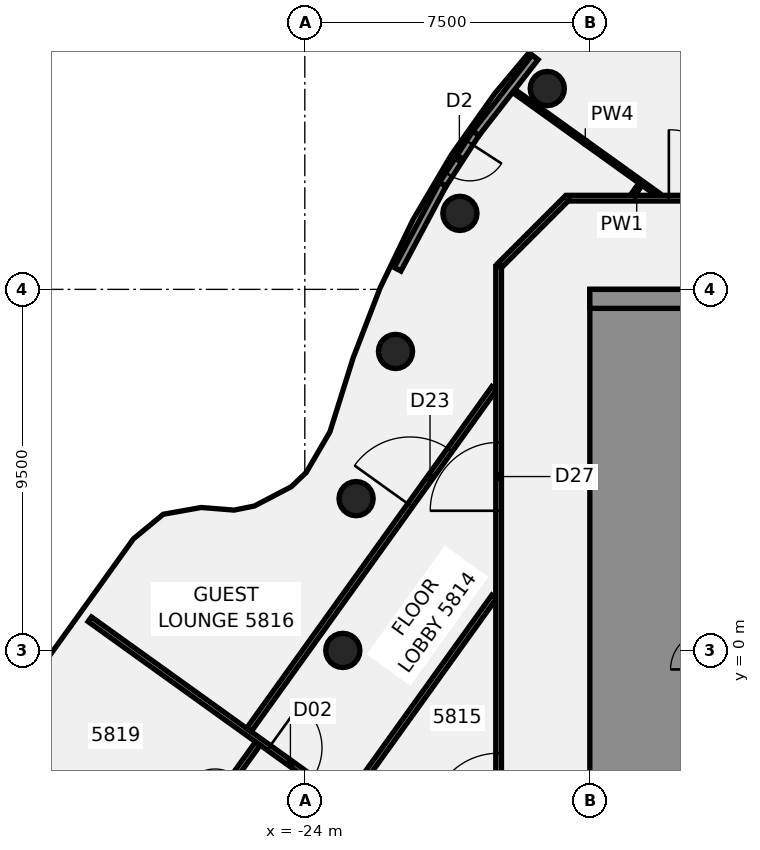
"""IFC4 building model, lengths in metres.
Left out: names, types, materials, properties, quantities, classifications, styles, units other than length and angle.
Written with IfcOpenShell. Run it as: python <this file> out.ifc"""

import sys

from ifc_helpers import new_model, si_unit, direction, frame, frame_2d, origin, origin_2d, place, context, subcontext, project, spatial, polyline, rectangle, circle, outline, extrude, element, fill, save


model = new_model("IFC4")
c1 = context("Model", 3, precision=1e-05, world=origin(), true_north=direction((0.0, 1.0)))
c2 = subcontext(c1, "Body", "Model", "MODEL_VIEW")
j1 = project(units=[si_unit("LENGTHUNIT", "METRE"), si_unit("PLANEANGLEUNIT", "RADIAN")], contexts=[c1])
p1 = place(None, origin())
s1 = spatial("IfcSite", under=j1, at=p1, CompositionType="ELEMENT")
p2 = place(p1, origin())
s2 = spatial("IfcBuilding", under=s1, at=p2, CompositionType="ELEMENT")
p3 = place(p2, frame((0.0, 0.0, 230.7)))
s3 = spatial("IfcBuildingStorey", under=s2, at=p3, CompositionType="ELEMENT", Elevation=230.7)
for number, where, z_axis, x_axis in (
    (1, (-17.619, 14.784, -0.14), (0.0, 0.0, 1.0), (1.0, 0.0, 0.0)),
    (2, (-19.919, 11.5, -0.14), (0.0, 0.0, 1.0), (1.0, 0.0, 0.0)),
    (3, (-21.613, 7.866, -0.14), (0.0, 0.0, 1.0), (1.0, 0.0, 0.0)),
    (4, (-22.651, 3.994, -0.14), (0.0, 0.0, 1.0), (1.0, 0.0, 0.0)),
    (5, (-23.0, 0.0, -0.14), (0.0, 0.0, 1.0), (1.0, 0.0, 0.0)),
):
    element("IfcColumn", number, at=place(p3, frame(where, z_axis=z_axis, x_axis=x_axis)), inside=s3, PredefinedType="COLUMN", context=c2, shape_type="SweptSolid", body=[
        extrude(circle(Radius=0.45, at=origin_2d()), origin(), (0.0, 0.0, 1.0), 3.6),
    ])
p4 = place(p3, frame((-29.658, 0.819, 0.0), z_axis=(0.0, 0.0, 1.0), x_axis=(0.812385674916, -0.583120498003, 0.0)))
e6 = element("IfcWall", 6, at=p4, inside=s3, PredefinedType="PARTITIONING", context=c2, shape_type="SweptSolid", body=[
    extrude(rectangle(XDim=8.091, YDim=0.15, at=frame_2d((4.045, 0.0))), origin(), (0.0, 0.0, 1.0), 2.864),
])
p5 = place(p4, frame((5.799, 0.0, 0.0)))
e7 = element("IfcOpeningElement", 7, at=p5, cuts=e6, PredefinedType="OPENING", context=c2, shape_type="SweptSolid", body=[
    extrude(rectangle(XDim=1.4, YDim=2.1, at=frame_2d((0.7, 1.05))), frame((0.0, 0.085, 0.0), z_axis=(0.0, -1.0, 0.0), x_axis=(1.0, 0.0, 0.0)), (0.0, 0.0, 1.0), 0.17),
])
p6 = place(p3, frame((-18.533, 14.744, 0.0), z_axis=(0.0, 0.0, 1.0), x_axis=(0.812404895157, -0.583093720019, 0.0)))
e8 = element("IfcWall", 8, at=p6, inside=s3, PredefinedType="PARTITIONING", context=c2, shape_type="SweptSolid", body=[
    extrude(rectangle(XDim=4.713, YDim=0.1, at=frame_2d((2.357, 0.0))), origin(), (0.0, 0.0, 1.0), 2.864),
])
p7 = place(p3, frame((-17.065, 11.9, 0.0), z_axis=(0.0, 0.0, 1.0), x_axis=(1.0, 0.0, 0.0)))
e9 = element("IfcWall", 9, at=p7, inside=s3, PredefinedType="PARTITIONING", context=c2, shape_type="SweptSolid", body=[
    extrude(rectangle(XDim=34.165, YDim=0.15, at=frame_2d((17.083, 0.0))), origin(), (0.0, 0.0, 1.0), 2.864),
])
p8 = place(p7, frame((24.726, 0.0, 0.0)))
e10 = element("IfcOpeningElement", 10, at=p8, cuts=e9, PredefinedType="OPENING", context=c2, shape_type="SweptSolid", body=[
    extrude(rectangle(XDim=1.8, YDim=2.1, at=frame_2d((0.9, 1.05))), frame((0.0, 0.085, 0.0), z_axis=(0.0, -1.0, 0.0), x_axis=(1.0, 0.0, 0.0)), (0.0, 0.0, 1.0), 0.17),
])
p9 = place(p7, frame((9.395, 0.0, 0.0)))
e11 = element("IfcOpeningElement", 11, at=p9, cuts=e9, PredefinedType="OPENING", context=c2, shape_type="SweptSolid", body=[
    extrude(rectangle(XDim=1.8, YDim=2.1, at=frame_2d((0.9, 1.05))), frame((0.0, 0.085, 0.0), z_axis=(0.0, -1.0, 0.0), x_axis=(1.0, 0.0, 0.0)), (0.0, 0.0, 1.0), 0.17),
])
p10 = place(p7, frame((2.645, 0.0, 0.0)))
e12 = element("IfcOpeningElement", 12, at=p10, cuts=e9, PredefinedType="OPENING", context=c2, shape_type="SweptSolid", body=[
    extrude(rectangle(XDim=1.8, YDim=2.1, at=frame_2d((0.9, 1.05))), frame((0.0, 0.085, 0.0), z_axis=(0.0, -1.0, 0.0), x_axis=(1.0, 0.0, 0.0)), (0.0, 0.0, 1.0), 0.17),
])
p11 = place(p3, frame((-18.872, 10.128, 0.0), z_axis=(0.0, 0.0, 1.0), x_axis=(0.707106781187, 0.707106781187, 0.0)))
e13 = element("IfcWall", 13, at=p11, inside=s3, PredefinedType="PARTITIONING", context=c2, shape_type="SweptSolid", body=[
    extrude(rectangle(XDim=2.505, YDim=0.15, at=frame_2d((1.253, 0.0))), origin(), (0.0, 0.0, 1.0), 2.864),
])
p12 = place(p3, frame((-27.5, -5.604, 0.0), z_axis=(0.0, 0.0, 1.0), x_axis=(0.583087553975, 0.812409320724, 0.0)))
e14 = element("IfcWall", 14, at=p12, inside=s3, PredefinedType="PARTITIONING", context=c2, shape_type="SweptSolid", body=[
    extrude(rectangle(XDim=3.881, YDim=0.15, at=frame_2d((1.94, 0.0))), origin(), (0.0, 0.0, 1.0), 2.864),
])
p13 = place(p12, frame((1.95, 0.0, 0.0)))
e15 = element("IfcOpeningElement", 15, at=p13, cuts=e14, PredefinedType="OPENING", context=c2, shape_type="SweptSolid", body=[
    extrude(rectangle(XDim=0.9, YDim=2.1, at=frame_2d((0.45, 1.05))), frame((0.0, 0.085, 0.0), z_axis=(0.0, -1.0, 0.0), x_axis=(1.0, 0.0, 0.0)), (0.0, 0.0, 1.0), 0.17),
])
p14 = place(p3, frame((-25.469, -2.089, 0.0), z_axis=(0.0, 0.0, 1.0), x_axis=(0.583125400674, 0.812382155816, 0.0)))
e16 = element("IfcWall", 16, at=p14, inside=s3, PredefinedType="PARTITIONING", context=c2, shape_type="SweptSolid", body=[
    extrude(rectangle(XDim=11.066, YDim=0.15, at=frame_2d((5.533, 0.0))), origin(), (0.0, 0.0, 1.0), 2.864),
])
p15 = place(p14, frame((7.27, 0.0, 0.0)))
e17 = element("IfcOpeningElement", 17, at=p15, cuts=e16, PredefinedType="OPENING", context=c2, shape_type="SweptSolid", body=[
    extrude(rectangle(XDim=1.8, YDim=2.1, at=frame_2d((0.9, 1.05))), frame((0.0, 0.085, 0.0), z_axis=(0.0, -1.0, 0.0), x_axis=(1.0, 0.0, 0.0)), (0.0, 0.0, 1.0), 0.17),
])
p16 = place(p3, frame((-15.367, 11.985, 0.0), z_axis=(0.0, 0.0, 1.0), x_axis=(0.583110991792, 0.812392498274, 0.0)))
e18 = element("IfcWall", 18, at=p16, inside=s3, PredefinedType="PARTITIONING", context=c2, shape_type="SweptSolid", body=[
    extrude(rectangle(XDim=0.345, YDim=0.1, at=frame_2d((0.172, 0.0))), origin(), (0.0, 0.0, 1.0), 2.864),
])
p17 = place(p3, frame((-22.581, -3.553, 0.0), z_axis=(0.0, 0.0, 1.0), x_axis=(0.58311080808, 0.812392630137, 0.0)))
e19 = element("IfcWall", 19, at=p17, inside=s3, PredefinedType="PARTITIONING", context=c2, shape_type="SweptSolid", body=[
    extrude(rectangle(XDim=6.112, YDim=0.15, at=frame_2d((3.056, 0.0))), origin(), (0.0, 0.0, 1.0), 2.864),
])
p18 = place(p3, frame((-18.9, -10.1, 0.0), z_axis=(0.0, 0.0, 1.0), x_axis=(0.0, 1.0, 0.0)))
e20 = element("IfcWall", 20, at=p18, inside=s3, PredefinedType="PARTITIONING", context=c2, shape_type="SweptSolid", body=[
    extrude(rectangle(XDim=20.2, YDim=0.15, at=frame_2d((10.1, 0.0))), origin(), (0.0, 0.0, 1.0), 2.864),
])
p19 = place(p18, frame((13.775, 0.0, 0.0)))
e21 = element("IfcOpeningElement", 21, at=p19, cuts=e20, PredefinedType="OPENING", context=c2, shape_type="SweptSolid", body=[
    extrude(rectangle(XDim=1.8, YDim=2.1, at=frame_2d((0.9, 1.05))), frame((0.0, 0.085, 0.0), z_axis=(0.0, -1.0, 0.0), x_axis=(1.0, 0.0, 0.0)), (0.0, 0.0, 1.0), 0.17),
])
p20 = place(p18, frame((5.597, 0.0, 0.0)))
e22 = element("IfcOpeningElement", 22, at=p20, cuts=e20, PredefinedType="OPENING", context=c2, shape_type="SweptSolid", body=[
    extrude(rectangle(XDim=1.8, YDim=2.1, at=frame_2d((0.9, 1.05))), frame((0.0, 0.085, 0.0), z_axis=(0.0, -1.0, 0.0), x_axis=(1.0, 0.0, 0.0)), (0.0, 0.0, 1.0), 0.17),
])
p21 = place(p3, frame((-17.941, 15.606, 0.0), z_axis=(0.0, 0.0, 1.0), x_axis=(-0.614194041126, -0.789155041703, 0.0)))
e23 = element("IfcWall", 23, at=p21, inside=s3, PredefinedType="SOLIDWALL", context=c2, shape_type="SweptSolid", body=[
    extrude(rectangle(XDim=2.534, YDim=0.2, at=frame_2d((1.267, 0.0))), origin(), (0.0, 0.0, 1.0), 3.46),
])
p22 = place(p3, frame((-20.368, 12.266, 0.0), z_axis=(0.0, 0.0, 1.0), x_axis=(-0.470148137958, -0.882587518819, 0.0)))
e24 = element("IfcWall", 24, at=p22, inside=s3, PredefinedType="SOLIDWALL", context=c2, shape_type="SweptSolid", body=[
    extrude(rectangle(XDim=2.534, YDim=0.2, at=frame_2d((1.267, 0.0))), origin(), (0.0, 0.0, 1.0), 3.46),
])
p23 = place(p3, frame((-19.498, 13.607, 0.0), z_axis=(0.0, 0.0, 1.0), x_axis=(-0.54458033139, -0.838708687604, 0.0)))
e25 = element("IfcWall", 25, at=p23, inside=s3, PredefinedType="SOLIDWALL", context=c2, shape_type="SweptSolid", body=[
    extrude(rectangle(XDim=1.599, YDim=0.2, at=frame_2d((0.799, 0.0))), origin(), (0.0, 0.0, 1.0), 3.46),
])
p24 = place(p23, frame((0.299, 0.0, 0.0)))
e26 = element("IfcOpeningElement", 26, at=p24, cuts=e25, PredefinedType="OPENING", context=c2, shape_type="SweptSolid", body=[
    extrude(rectangle(XDim=1.0, YDim=2.4, at=frame_2d((0.5, 1.2))), frame((0.0, 0.11, 0.0), z_axis=(0.0, -1.0, 0.0), x_axis=(1.0, 0.0, 0.0)), (0.0, 0.0, 1.0), 0.22),
])
p25 = place(p3, origin())
e27 = element("IfcWall", 27, at=p25, inside=s3, PredefinedType="SHEAR", context=c2, shape_type="SweptSolid", body=[
    extrude(outline(polyline([(-13.5, -8.125), (-16.0, -8.125), (-16.0, -5.625), (-13.5, -5.625), (-13.5, -5.375), (-16.0, -5.375), (-16.0, 5.375), (-13.5, 5.375), (-13.5, 5.625), (-16.0, 5.625), (-16.0, 8.125), (-13.5, 8.125), (-13.5, 9.0), (-16.0, 9.0), (-16.5, 9.0), (-16.5, -9.0), (-16.0, -9.0), (-13.5, -9.0), (-13.5, -8.125)])), origin(), (0.0, 0.0, 1.0), 3.46),
])
p26 = place(p3, frame((-16.5, 9.25, 0.0), z_axis=(0.0, 0.0, 1.0), x_axis=(1.0, 0.0, 0.0)))
e28 = element("IfcWall", 28, at=p26, inside=s3, PredefinedType="SHEAR", context=c2, shape_type="SweptSolid", body=[
    extrude(rectangle(XDim=13.0, YDim=0.5, at=frame_2d((6.5, 0.0))), origin(), (0.0, 0.0, 1.0), 3.46),
])
p27 = place(p5, origin())
e29 = element("IfcDoor", 29, at=p27, inside=s3, OperationType="DOUBLE_DOOR_SINGLE_SWING", PredefinedType="DOOR", context=c2, shape_type="SweptSolid", body=[
    extrude(rectangle(XDim=1.4, YDim=2.1, at=frame_2d((0.7, 1.05))), frame((0.0, 0.025, 0.0), z_axis=(0.0, -1.0, 0.0), x_axis=(1.0, 0.0, 0.0)), (0.0, 0.0, 1.0), 0.05),
])
fill(e7, e29)
p28 = place(p10, origin())
e30 = element("IfcDoor", 30, at=p28, inside=s3, OperationType="DOUBLE_DOOR_SINGLE_SWING", PredefinedType="DOOR", context=c2, shape_type="SweptSolid", body=[
    extrude(rectangle(XDim=1.8, YDim=2.1, at=frame_2d((0.9, 1.05))), frame((0.0, 0.025, 0.0), z_axis=(0.0, -1.0, 0.0), x_axis=(1.0, 0.0, 0.0)), (0.0, 0.0, 1.0), 0.05),
])
fill(e12, e30)
p29 = place(p15, origin())
e31 = element("IfcDoor", 31, at=p29, inside=s3, OperationType="DOUBLE_DOOR_SINGLE_SWING", PredefinedType="DOOR", context=c2, shape_type="SweptSolid", body=[
    extrude(rectangle(XDim=1.8, YDim=2.1, at=frame_2d((0.9, 1.05))), frame((0.0, 0.025, 0.0), z_axis=(0.0, -1.0, 0.0), x_axis=(1.0, 0.0, 0.0)), (0.0, 0.0, 1.0), 0.05),
])
fill(e17, e31)
p30 = place(p19, frame((1.8, 0.0, 0.0), z_axis=(0.0, 0.0, 1.0), x_axis=(-1.0, 0.0, 0.0)))
e32 = element("IfcDoor", 32, at=p30, inside=s3, OperationType="DOUBLE_DOOR_SINGLE_SWING", PredefinedType="DOOR", context=c2, shape_type="SweptSolid", body=[
    extrude(rectangle(XDim=1.8, YDim=2.1, at=frame_2d((0.9, 1.05))), frame((0.0, 0.025, 0.0), z_axis=(0.0, -1.0, 0.0), x_axis=(1.0, 0.0, 0.0)), (0.0, 0.0, 1.0), 0.05),
])
fill(e21, e32)
p31 = place(p20, origin())
e33 = element("IfcDoor", 33, at=p31, inside=s3, OperationType="DOUBLE_DOOR_SINGLE_SWING", PredefinedType="DOOR", context=c2, shape_type="SweptSolid", body=[
    extrude(rectangle(XDim=1.8, YDim=2.1, at=frame_2d((0.9, 1.05))), frame((0.0, 0.025, 0.0), z_axis=(0.0, -1.0, 0.0), x_axis=(1.0, 0.0, 0.0)), (0.0, 0.0, 1.0), 0.05),
])
fill(e22, e33)
p32 = place(p24, origin())
e34 = element("IfcDoor", 34, at=p32, inside=s3, OperationType="SINGLE_SWING_LEFT", PredefinedType="DOOR", context=c2, shape_type="SweptSolid", body=[
    extrude(rectangle(XDim=1.0, YDim=2.4, at=frame_2d((0.5, 1.2))), frame((0.0, 0.025, 0.0), z_axis=(0.0, -1.0, 0.0), x_axis=(1.0, 0.0, 0.0)), (0.0, 0.0, 1.0), 0.05),
])
fill(e26, e34)
save(model, sys.argv[1])
